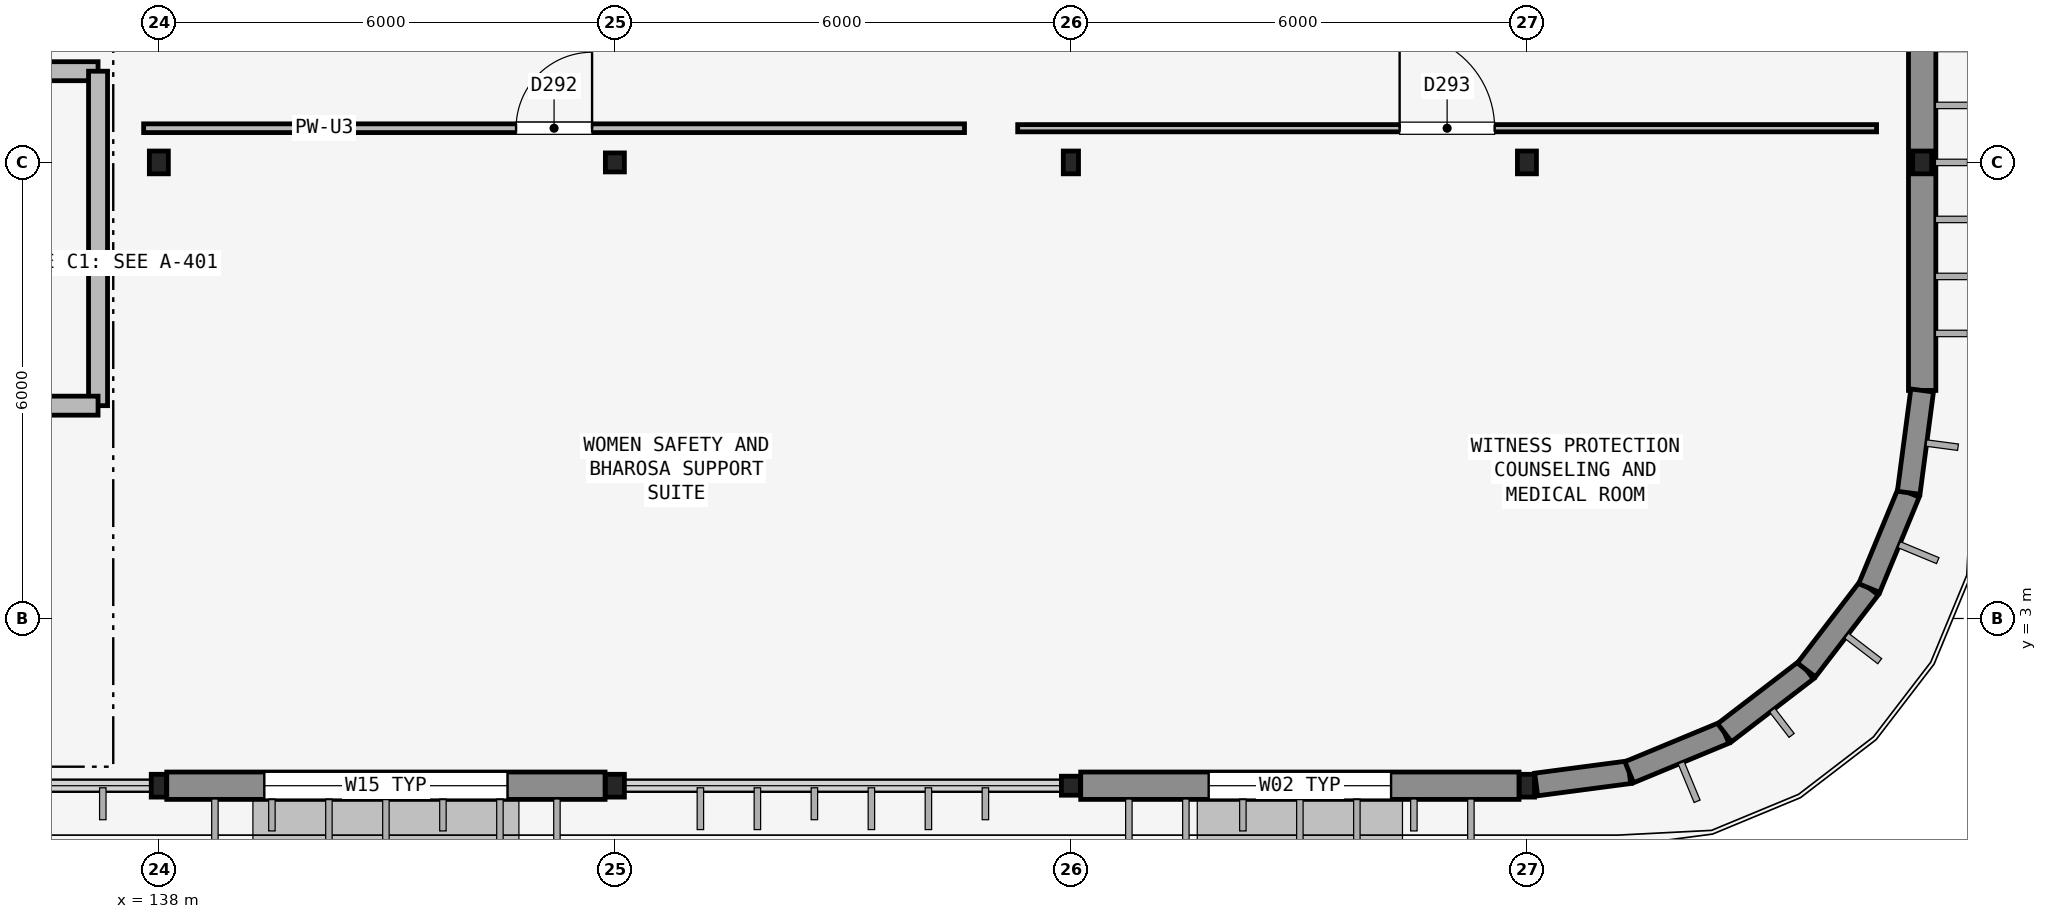
"""IFC4 building model, lengths in metres.
Left out: names, types, materials, properties, quantities, classifications, styles, units other than length and angle.
Written with IfcOpenShell. Run it as: python <this file> out.ifc"""

import sys

from ifc_helpers import new_model, si_unit, direction, frame, frame_2d, origin, origin_2d, place, context, subcontext, project, spatial, rectangle, hollow_rectangle, i_section, extrude, element, fill, save


model = new_model("IFC4")
c1 = context("Model", 3, precision=1e-05, world=origin(), true_north=direction((0.0, 1.0)))
c2 = subcontext(c1, "Body", "Model", "MODEL_VIEW")
j1 = project(units=[si_unit("LENGTHUNIT", "METRE"), si_unit("PLANEANGLEUNIT", "RADIAN")], contexts=[c1])
p1 = place(None, origin())
s1 = spatial("IfcSite", under=j1, at=p1, CompositionType="ELEMENT")
p2 = place(p1, origin())
s2 = spatial("IfcBuilding", under=s1, at=p2, CompositionType="ELEMENT")
p3 = place(p2, frame((0.0, 0.0, 26.1)))
s3 = spatial("IfcBuildingStorey", under=s2, at=p3, CompositionType="ELEMENT", Elevation=26.1)
p4 = place(p3, frame((138.0, 0.8, 0.0), z_axis=(0.0, 0.0, 1.0), x_axis=(1.0, 0.0, 0.0)))
e1 = element("IfcColumn", 1, at=p4, inside=s3, PredefinedType="COLUMN", context=c2, shape_type="SweptSolid", body=[
    extrude(hollow_rectangle(XDim=0.2, YDim=0.3, WallThickness=0.012, InnerFilletRadius=0.012, OuterFilletRadius=0.024, at=origin_2d()), origin(), (0.0, 0.0, 1.0), 3.9),
])
for number, where, z_axis, x_axis in (
    (2, (138.0, 9.0, 0.0), (0.0, 0.0, 1.0), (1.0, 0.0, 0.0)),
    (3, (144.0, 0.8, 0.0), (0.0, 0.0, 1.0), (1.0, 0.0, 0.0)),
):
    element("IfcColumn", number, at=place(p3, frame(where, z_axis=z_axis, x_axis=x_axis)), inside=s3, PredefinedType="COLUMN", context=c2, shape_type="SweptSolid", body=[
        extrude(i_section(OverallWidth=0.25, OverallDepth=0.3, WebThickness=0.01, FlangeThickness=0.01, FilletRadius=0.012, at=origin_2d()), origin(), (0.0, 0.0, 1.0), 3.9),
    ])
for number, where, z_axis, x_axis in (
    (4, (144.0, 9.0, 0.0), (0.0, 0.0, 1.0), (1.0, 0.0, 0.0)),
    (5, (150.0, 0.8, 0.0), (0.0, 0.0, 1.0), (1.0, 0.0, 0.0)),
):
    element("IfcColumn", number, at=place(p3, frame(where, z_axis=z_axis, x_axis=x_axis)), inside=s3, PredefinedType="COLUMN", context=c2, shape_type="SweptSolid", body=[
        extrude(hollow_rectangle(XDim=0.25, YDim=0.25, WallThickness=0.012, InnerFilletRadius=0.012, OuterFilletRadius=0.024, at=origin_2d()), origin(), (0.0, 0.0, 1.0), 3.9),
    ])
for number, where, z_axis, x_axis in (
    (6, (150.0, 9.0, 0.0), (0.0, 0.0, 1.0), (1.0, 0.0, 0.0)),
    (7, (156.0, 0.8, 0.0), (0.0, 0.0, 1.0), (1.0, 0.0, 0.0)),
):
    element("IfcColumn", number, at=place(p3, frame(where, z_axis=z_axis, x_axis=x_axis)), inside=s3, PredefinedType="COLUMN", context=c2, shape_type="SweptSolid", body=[
        extrude(hollow_rectangle(XDim=0.2, YDim=0.3, WallThickness=0.012, InnerFilletRadius=0.012, OuterFilletRadius=0.024, at=origin_2d()), origin(), (0.0, 0.0, 1.0), 3.9),
    ])
for number, where, z_axis, x_axis in (
    (8, (156.0, 9.0, 0.0), (0.0, 0.0, 1.0), (1.0, 0.0, 0.0)),
    (9, (161.2, 9.0, 0.0), (0.0, 0.0, 1.0), (1.0, 0.0, 0.0)),
):
    element("IfcColumn", number, at=place(p3, frame(where, z_axis=z_axis, x_axis=x_axis)), inside=s3, PredefinedType="COLUMN", context=c2, shape_type="SweptSolid", body=[
        extrude(i_section(OverallWidth=0.25, OverallDepth=0.3, WebThickness=0.01, FlangeThickness=0.01, FilletRadius=0.012, at=origin_2d()), origin(), (0.0, 0.0, 1.0), 3.9),
    ])
p5 = place(p3, frame((138.104, 0.8, 0.0), z_axis=(0.0, 0.0, 1.0), x_axis=(1.0, 0.0, 0.0)))
e10 = element("IfcWall", 10, at=p5, inside=s3, PredefinedType="SOLIDWALL", context=c2, shape_type="SweptSolid", body=[
    extrude(rectangle(XDim=5.767, YDim=0.36, at=frame_2d((2.884, 0.0))), origin(), (0.0, 0.0, 1.0), 3.28),
])
p6 = place(p5, frame((1.283, 0.0, 0.8)))
e11 = element("IfcOpeningElement", 11, at=p6, cuts=e10, PredefinedType="OPENING", context=c2, shape_type="SweptSolid", body=[
    extrude(rectangle(XDim=3.2, YDim=1.8, at=frame_2d((1.6, 0.9))), frame((0.0, 0.19, 0.0), z_axis=(0.0, -1.0, 0.0), x_axis=(1.0, 0.0, 0.0)), (0.0, 0.0, 1.0), 0.38),
])
p7 = place(p3, frame((150.129, 0.8, 0.0), z_axis=(0.0, 0.0, 1.0), x_axis=(1.0, 0.0, 0.0)))
e12 = element("IfcWall", 12, at=p7, inside=s3, PredefinedType="SOLIDWALL", context=c2, shape_type="SweptSolid", body=[
    extrude(rectangle(XDim=5.767, YDim=0.36, at=frame_2d((2.884, 0.0))), origin(), (0.0, 0.0, 1.0), 3.28),
])
p8 = place(p7, frame((1.684, 0.0, 0.9)))
e13 = element("IfcOpeningElement", 13, at=p8, cuts=e12, PredefinedType="OPENING", context=c2, shape_type="SweptSolid", body=[
    extrude(rectangle(XDim=2.4, YDim=1.5, at=frame_2d((1.2, 0.75))), frame((0.0, 0.19, 0.0), z_axis=(0.0, -1.0, 0.0), x_axis=(1.0, 0.0, 0.0)), (0.0, 0.0, 1.0), 0.38),
])
p9 = place(p3, frame((161.2, 6.0, 0.0), z_axis=(0.0, 0.0, 1.0), x_axis=(0.0, 1.0, 0.0)))
e14 = element("IfcWall", 14, at=p9, inside=s3, PredefinedType="SOLIDWALL", context=c2, shape_type="SweptSolid", body=[
    extrude(rectangle(XDim=6.0, YDim=0.36, at=frame_2d((3.0, 0.0))), origin(), (0.0, 0.0, 1.0), 3.13),
])
p10 = place(p3, frame((156.122, 0.816, 0.0), z_axis=(0.0, 0.0, 1.0), x_axis=(0.991425337339, 0.130674406377, 0.0)))
e15 = element("IfcWall", 15, at=p10, inside=s3, PredefinedType="SOLIDWALL", context=c2, shape_type="SweptSolid", body=[
    extrude(rectangle(XDim=1.235, YDim=0.3, at=frame_2d((0.617, 0.0))), origin(), (0.0, 0.0, 1.0), 3.28),
])
for number, where, z_axis, x_axis in (
    (16, (157.346, 0.977, 0.0), (0.0, 0.0, 1.0), (0.924, 0.383, 0.0)),
    (17, (158.6, 1.497, 0.0), (0.0, 0.0, 1.0), (0.793, 0.609, 0.0)),
    (18, (159.677, 2.323, 0.0), (0.0, 0.0, 1.0), (0.609, 0.793, 0.0)),
    (19, (160.503, 3.4, 0.0), (0.0, 0.0, 1.0), (0.383, 0.924, 0.0)),
):
    element("IfcWall", number, at=place(p3, frame(where, z_axis=z_axis, x_axis=x_axis)), inside=s3, PredefinedType="SOLIDWALL", context=c2, shape_type="SweptSolid", body=[
        extrude(rectangle(XDim=1.357, YDim=0.3, at=frame_2d((0.679, 0.0))), origin(), (0.0, 0.0, 1.0), 3.685),
    ])
p11 = place(p3, frame((161.023, 4.654, 0.0), z_axis=(0.0, 0.0, 1.0), x_axis=(0.130561507967, 0.991440211328, 0.0)))
e20 = element("IfcWall", 20, at=p11, inside=s3, PredefinedType="SOLIDWALL", context=c2, shape_type="SweptSolid", body=[
    extrude(rectangle(XDim=1.358, YDim=0.3, at=frame_2d((0.679, 0.0))), origin(), (0.0, 0.0, 1.0), 3.685),
])
p12 = place(p3, frame((131.55, 10.2, 0.0), z_axis=(0.0, 0.0, 1.0), x_axis=(1.0, 0.0, 0.0)))
e21 = element("IfcWall", 21, at=p12, inside=s3, PredefinedType="PARTITIONING", context=c2, shape_type="SweptSolid", body=[
    extrude(rectangle(XDim=5.65, YDim=0.25, at=frame_2d((2.825, 0.0))), origin(), (0.0, 0.0, 1.0), 3.273),
])
p13 = place(p12, frame((2.075, 0.0, 0.0)))
e22 = element("IfcOpeningElement", 22, at=p13, cuts=e21, PredefinedType="OPENING", context=c2, shape_type="SweptSolid", body=[
    extrude(rectangle(XDim=1.5, YDim=2.15, at=frame_2d((0.75, 1.075))), frame((0.0, 0.135, 0.0), z_axis=(0.0, -1.0, 0.0), x_axis=(1.0, 0.0, 0.0)), (0.0, 0.0, 1.0), 0.27),
])
p14 = place(p3, frame((137.2, 5.8, 0.0), z_axis=(0.0, 0.0, 1.0), x_axis=(0.0, 1.0, 0.0)))
e23 = element("IfcWall", 23, at=p14, inside=s3, PredefinedType="PARTITIONING", context=c2, shape_type="SweptSolid", body=[
    extrude(rectangle(XDim=4.4, YDim=0.25, at=frame_2d((2.2, 0.0))), origin(), (0.0, 0.0, 1.0), 3.28),
])
p15 = place(p3, frame((135.6, 5.8, 0.0), z_axis=(0.0, 0.0, 1.0), x_axis=(1.0, 0.0, 0.0)))
e24 = element("IfcWall", 24, at=p15, inside=s3, PredefinedType="PARTITIONING", context=c2, shape_type="SweptSolid", body=[
    extrude(rectangle(XDim=1.6, YDim=0.25, at=frame_2d((0.8, 0.0))), origin(), (0.0, 0.0, 1.0), 3.68),
])
p16 = place(p3, frame((137.8, 9.45, 0.0), z_axis=(0.0, 0.0, 1.0), x_axis=(1.0, 0.0, 0.0)))
e25 = element("IfcWall", 25, at=p16, inside=s3, PredefinedType="PARTITIONING", context=c2, shape_type="SweptSolid", body=[
    extrude(rectangle(XDim=10.8, YDim=0.115, at=frame_2d((5.4, 0.0))), origin(), (0.0, 0.0, 1.0), 3.273),
])
p17 = place(p16, frame((4.9, 0.0, 0.0)))
e26 = element("IfcOpeningElement", 26, at=p17, cuts=e25, PredefinedType="OPENING", context=c2, shape_type="SweptSolid", body=[
    extrude(rectangle(XDim=1.0, YDim=2.15, at=frame_2d((0.5, 1.075))), frame((0.0, 0.067, 0.0), z_axis=(0.0, -1.0, 0.0), x_axis=(1.0, 0.0, 0.0)), (0.0, 0.0, 1.0), 0.135),
])
p18 = place(p3, frame((149.3, 9.45, 0.0), z_axis=(0.0, 0.0, 1.0), x_axis=(1.0, 0.0, 0.0)))
e27 = element("IfcWall", 27, at=p18, inside=s3, PredefinedType="PARTITIONING", context=c2, shape_type="SweptSolid", body=[
    extrude(rectangle(XDim=11.3, YDim=0.095, at=frame_2d((5.65, 0.0))), origin(), (0.0, 0.0, 1.0), 3.273),
])
p19 = place(p18, frame((5.025, 0.0, 0.0)))
e28 = element("IfcOpeningElement", 28, at=p19, cuts=e27, PredefinedType="OPENING", context=c2, shape_type="SweptSolid", body=[
    extrude(rectangle(XDim=1.25, YDim=2.15, at=frame_2d((0.625, 1.075))), frame((0.0, 0.057, 0.0), z_axis=(0.0, -1.0, 0.0), x_axis=(1.0, 0.0, 0.0)), (0.0, 0.0, 1.0), 0.115),
])
p20 = place(p6, origin())
e29 = element("IfcWindow", 29, at=p20, inside=s3, PartitioningType="SINGLE_PANEL", PredefinedType="WINDOW", context=c2, shape_type="SweptSolid", body=[
    extrude(rectangle(XDim=3.2, YDim=1.8, at=frame_2d((1.6, 0.9))), frame((0.0, 0.03, 0.0), z_axis=(0.0, -1.0, 0.0), x_axis=(1.0, 0.0, 0.0)), (0.0, 0.0, 1.0), 0.06),
])
fill(e11, e29)
p21 = place(p8, origin())
e30 = element("IfcWindow", 30, at=p21, inside=s3, PartitioningType="SINGLE_PANEL", PredefinedType="WINDOW", context=c2, shape_type="SweptSolid", body=[
    extrude(rectangle(XDim=2.4, YDim=1.5, at=frame_2d((1.2, 0.75))), frame((0.0, 0.03, 0.0), z_axis=(0.0, -1.0, 0.0), x_axis=(1.0, 0.0, 0.0)), (0.0, 0.0, 1.0), 0.06),
])
fill(e13, e30)
p22 = place(p17, origin())
e31 = element("IfcDoor", 31, at=p22, inside=s3, OperationType="SINGLE_SWING_RIGHT", PredefinedType="DOOR", context=c2, shape_type="SweptSolid", body=[
    extrude(rectangle(XDim=1.0, YDim=2.15, at=frame_2d((0.5, 1.075))), frame((0.0, 0.025, 0.0), z_axis=(0.0, -1.0, 0.0), x_axis=(1.0, 0.0, 0.0)), (0.0, 0.0, 1.0), 0.05),
])
fill(e26, e31)
p23 = place(p19, origin())
e32 = element("IfcDoor", 32, at=p23, inside=s3, OperationType="SINGLE_SWING_LEFT", PredefinedType="DOOR", context=c2, shape_type="SweptSolid", body=[
    extrude(rectangle(XDim=1.25, YDim=2.15, at=frame_2d((0.625, 1.075))), frame((0.0, 0.025, 0.0), z_axis=(0.0, -1.0, 0.0), x_axis=(1.0, 0.0, 0.0)), (0.0, 0.0, 1.0), 0.05),
])
fill(e28, e32)
save(model, sys.argv[1])
